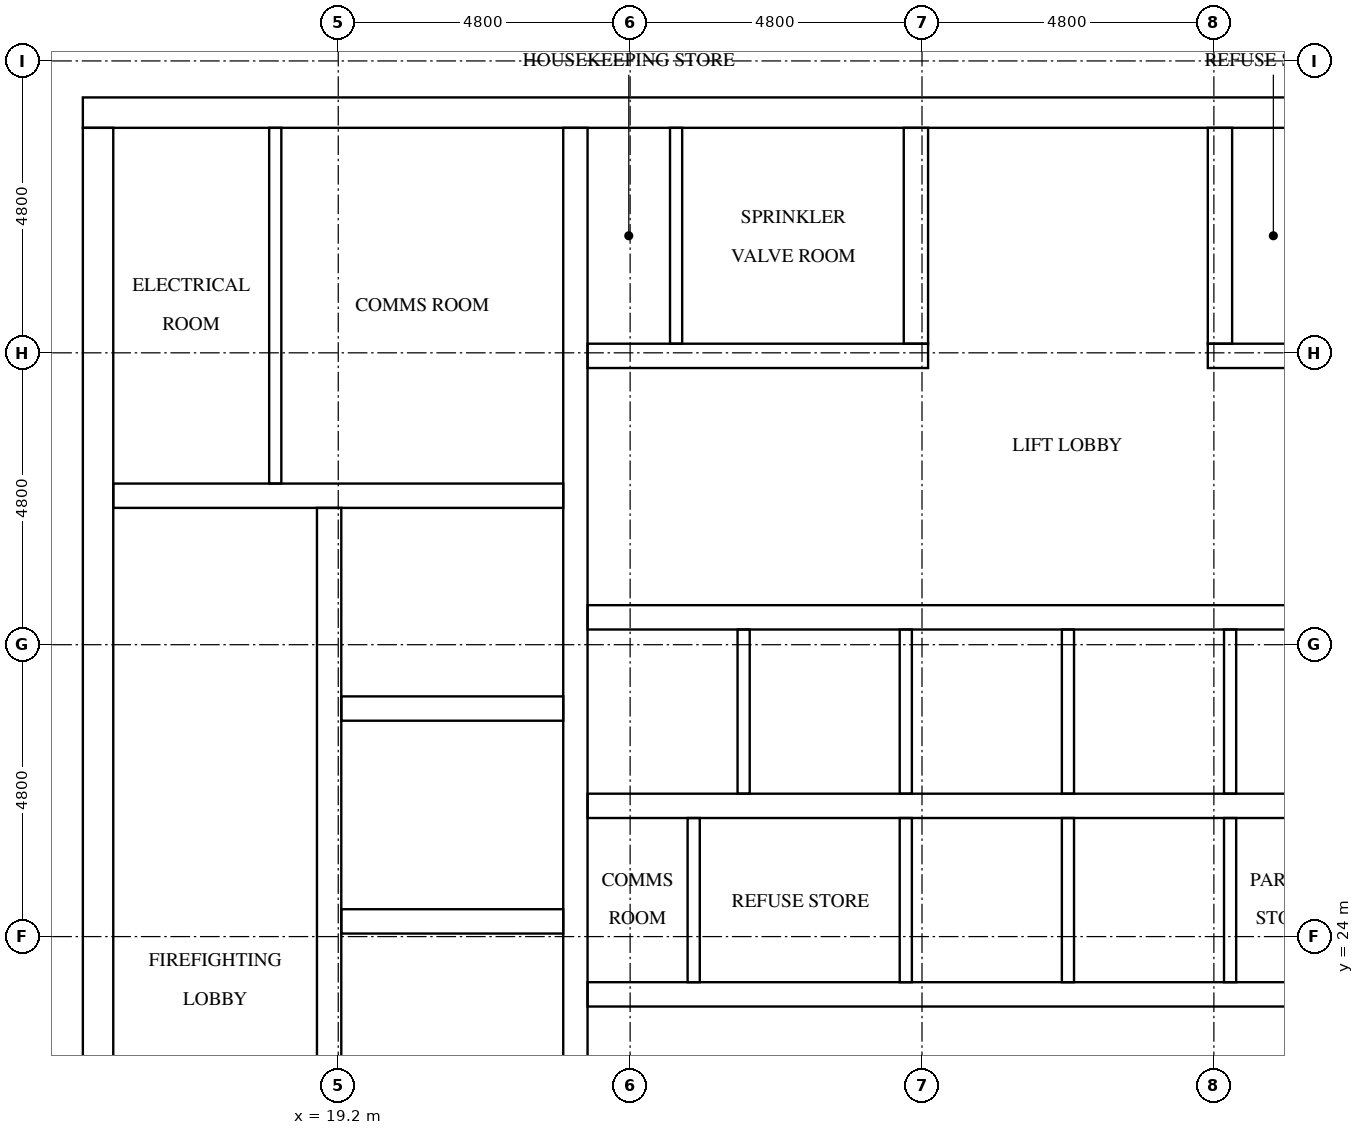
"""IFC4 building model, lengths in metres.
Left out: names, types, materials, properties, quantities, classifications, styles, units other than length and angle.
Written with IfcOpenShell. Run it as: python <this file> out.ifc"""

import sys

from ifc_helpers import new_model, si_unit, direction, frame, frame_2d, origin, place, context, subcontext, project, spatial, rectangle, extrude, element, fill, save


model = new_model("IFC4")
c1 = context("Model", 3, precision=1e-05, world=origin(), true_north=direction((0.0, 1.0)))
c2 = subcontext(c1, "Body", "Model", "MODEL_VIEW")
j1 = project(units=[si_unit("LENGTHUNIT", "METRE"), si_unit("PLANEANGLEUNIT", "RADIAN")], contexts=[c1])
p1 = place(None, origin())
s1 = spatial("IfcSite", under=j1, at=p1, CompositionType="ELEMENT")
p2 = place(p1, origin())
s2 = spatial("IfcBuilding", under=s1, at=p2, CompositionType="ELEMENT")
p3 = place(p2, frame((0.0, 0.0, 268.6)))
s3 = spatial("IfcBuildingStorey", under=s2, at=p3, CompositionType="ELEMENT", Elevation=268.6)
p4 = place(p3, frame((15.0, 37.55, 0.0), z_axis=(0.0, 0.0, 1.0), x_axis=(1.0, 0.0, 0.0)))
e1 = element("IfcWall", 1, at=p4, inside=s3, PredefinedType="SHEAR", context=c2, shape_type="SweptSolid", body=[
    extrude(rectangle(XDim=32.4, YDim=0.5, at=frame_2d((16.2, 0.0))), origin(), (0.0, 0.0, 1.0), 3.2),
])
p5 = place(p4, frame((15.3, 0.0, 0.0)))
e2 = element("IfcOpeningElement", 2, at=p5, cuts=e1, PredefinedType="OPENING", context=c2, shape_type="SweptSolid", body=[
    extrude(rectangle(XDim=1.8, YDim=2.1, at=frame_2d((0.9, 1.05))), frame((0.0, 0.26, 0.0), z_axis=(0.0, -1.0, 0.0), x_axis=(1.0, 0.0, 0.0)), (0.0, 0.0, 1.0), 0.52),
])
p6 = place(p4, frame((1.282, 0.0, 0.0)))
e3 = element("IfcOpeningElement", 3, at=p6, cuts=e1, PredefinedType="OPENING", context=c2, shape_type="SweptSolid", body=[
    extrude(rectangle(XDim=1.0, YDim=2.1, at=frame_2d((0.5, 1.05))), frame((0.0, 0.26, 0.0), z_axis=(0.0, -1.0, 0.0), x_axis=(1.0, 0.0, 0.0)), (0.0, 0.0, 1.0), 0.52),
])
p7 = place(p4, frame((5.082, 0.0, 0.0)))
e4 = element("IfcOpeningElement", 4, at=p7, cuts=e1, PredefinedType="OPENING", context=c2, shape_type="SweptSolid", body=[
    extrude(rectangle(XDim=1.0, YDim=2.1, at=frame_2d((0.5, 1.05))), frame((0.0, 0.26, 0.0), z_axis=(0.0, -1.0, 0.0), x_axis=(1.0, 0.0, 0.0)), (0.0, 0.0, 1.0), 0.52),
])
p8 = place(p3, frame((15.25, 15.5, 0.0), z_axis=(0.0, 0.0, 1.0), x_axis=(0.0, 1.0, 0.0)))
e5 = element("IfcWall", 5, at=p8, inside=s3, PredefinedType="SHEAR", context=c2, shape_type="SweptSolid", body=[
    extrude(rectangle(XDim=21.8, YDim=0.5, at=frame_2d((10.9, 0.0))), origin(), (0.0, 0.0, 1.0), 3.2),
])
p9 = place(p8, frame((5.26, 0.0, 0.0)))
e6 = element("IfcOpeningElement", 6, at=p9, cuts=e5, PredefinedType="OPENING", context=c2, shape_type="SweptSolid", body=[
    extrude(rectangle(XDim=1.2, YDim=2.1, at=frame_2d((0.6, 1.05))), frame((0.0, 0.26, 0.0), z_axis=(0.0, -1.0, 0.0), x_axis=(1.0, 0.0, 0.0)), (0.0, 0.0, 1.0), 0.52),
])
p10 = place(p3, frame((19.05, 15.5, 0.0), z_axis=(0.0, 0.0, 1.0), x_axis=(0.0, 1.0, 0.0)))
e7 = element("IfcWall", 7, at=p10, inside=s3, PredefinedType="SHEAR", context=c2, shape_type="SweptSolid", body=[
    extrude(rectangle(XDim=15.55, YDim=0.4, at=frame_2d((7.775, 0.0))), origin(), (0.0, 0.0, 1.0), 3.2),
])
p11 = place(p10, frame((9.95, 0.0, 0.0)))
e8 = element("IfcOpeningElement", 8, at=p11, cuts=e7, PredefinedType="OPENING", context=c2, shape_type="SweptSolid", body=[
    extrude(rectangle(XDim=1.1, YDim=2.1, at=frame_2d((0.55, 1.05))), frame((0.0, 0.21, 0.0), z_axis=(0.0, -1.0, 0.0), x_axis=(1.0, 0.0, 0.0)), (0.0, 0.0, 1.0), 0.42),
])
p12 = place(p10, frame((13.45, 0.0, 0.0)))
e9 = element("IfcOpeningElement", 9, at=p12, cuts=e7, PredefinedType="OPENING", context=c2, shape_type="SweptSolid", body=[
    extrude(rectangle(XDim=1.1, YDim=2.1, at=frame_2d((0.55, 1.05))), frame((0.0, 0.21, 0.0), z_axis=(0.0, -1.0, 0.0), x_axis=(1.0, 0.0, 0.0)), (0.0, 0.0, 1.0), 0.42),
])
p13 = place(p10, frame((0.7, 0.0, 0.0)))
e10 = element("IfcOpeningElement", 10, at=p13, cuts=e7, PredefinedType="OPENING", context=c2, shape_type="SweptSolid", body=[
    extrude(rectangle(XDim=1.2, YDim=2.1, at=frame_2d((0.6, 1.05))), frame((0.0, 0.21, 0.0), z_axis=(0.0, -1.0, 0.0), x_axis=(1.0, 0.0, 0.0)), (0.0, 0.0, 1.0), 0.42),
])
p14 = place(p3, frame((23.1, 15.5, 0.0), z_axis=(0.0, 0.0, 1.0), x_axis=(0.0, 1.0, 0.0)))
e11 = element("IfcWall", 11, at=p14, inside=s3, PredefinedType="SHEAR", context=c2, shape_type="SweptSolid", body=[
    extrude(rectangle(XDim=21.8, YDim=0.4, at=frame_2d((10.9, 0.0))), origin(), (0.0, 0.0, 1.0), 3.2),
])
for number, where, z_axis, x_axis in (
    (12, (19.25, 24.25, 0.0), (0.0, 0.0, 1.0), (1.0, 0.0, 0.0)),
    (13, (19.25, 27.75, 0.0), (0.0, 0.0, 1.0), (1.0, 0.0, 0.0)),
):
    element("IfcWall", number, at=place(p3, frame(where, z_axis=z_axis, x_axis=x_axis)), inside=s3, PredefinedType="SHEAR", context=c2, shape_type="SweptSolid", body=[
        extrude(rectangle(XDim=3.65, YDim=0.4, at=frame_2d((1.825, 0.0))), origin(), (0.0, 0.0, 1.0), 3.2),
    ])
p15 = place(p3, frame((15.5, 31.25, 0.0), z_axis=(0.0, 0.0, 1.0), x_axis=(1.0, 0.0, 0.0)))
e14 = element("IfcWall", 14, at=p15, inside=s3, PredefinedType="SHEAR", context=c2, shape_type="SweptSolid", body=[
    extrude(rectangle(XDim=7.4, YDim=0.4, at=frame_2d((3.7, 0.0))), origin(), (0.0, 0.0, 1.0), 3.2),
])
p16 = place(p3, frame((23.3, 23.05, 0.0), z_axis=(0.0, 0.0, 1.0), x_axis=(1.0, 0.0, 0.0)))
e15 = element("IfcWall", 15, at=p16, inside=s3, PredefinedType="SHEAR", context=c2, shape_type="SweptSolid", body=[
    extrude(rectangle(XDim=15.8, YDim=0.4, at=frame_2d((7.9, 0.0))), origin(), (0.0, 0.0, 1.0), 3.2),
])
p17 = place(p16, frame((0.323, 0.0, 0.0)))
e16 = element("IfcOpeningElement", 16, at=p17, cuts=e15, PredefinedType="OPENING", context=c2, shape_type="SweptSolid", body=[
    extrude(rectangle(XDim=1.0, YDim=2.1, at=frame_2d((0.5, 1.05))), frame((0.0, 0.21, 0.0), z_axis=(0.0, -1.0, 0.0), x_axis=(1.0, 0.0, 0.0)), (0.0, 0.0, 1.0), 0.42),
])
p18 = place(p16, frame((2.989, 0.0, 0.0)))
e17 = element("IfcOpeningElement", 17, at=p18, cuts=e15, PredefinedType="OPENING", context=c2, shape_type="SweptSolid", body=[
    extrude(rectangle(XDim=1.0, YDim=2.1, at=frame_2d((0.5, 1.05))), frame((0.0, 0.21, 0.0), z_axis=(0.0, -1.0, 0.0), x_axis=(1.0, 0.0, 0.0)), (0.0, 0.0, 1.0), 0.42),
])
p19 = place(p16, frame((10.989, 0.0, 0.0)))
e18 = element("IfcOpeningElement", 18, at=p19, cuts=e15, PredefinedType="OPENING", context=c2, shape_type="SweptSolid", body=[
    extrude(rectangle(XDim=1.0, YDim=2.1, at=frame_2d((0.5, 1.05))), frame((0.0, 0.21, 0.0), z_axis=(0.0, -1.0, 0.0), x_axis=(1.0, 0.0, 0.0)), (0.0, 0.0, 1.0), 0.42),
])
p20 = place(p16, frame((13.656, 0.0, 0.0)))
e19 = element("IfcOpeningElement", 19, at=p20, cuts=e15, PredefinedType="OPENING", context=c2, shape_type="SweptSolid", body=[
    extrude(rectangle(XDim=1.0, YDim=2.1, at=frame_2d((0.5, 1.05))), frame((0.0, 0.21, 0.0), z_axis=(0.0, -1.0, 0.0), x_axis=(1.0, 0.0, 0.0)), (0.0, 0.0, 1.0), 0.42),
])
p21 = place(p3, frame((23.3, 26.15, 0.0), z_axis=(0.0, 0.0, 1.0), x_axis=(1.0, 0.0, 0.0)))
e20 = element("IfcWall", 20, at=p21, inside=s3, PredefinedType="SHEAR", context=c2, shape_type="SweptSolid", body=[
    extrude(rectangle(XDim=15.8, YDim=0.4, at=frame_2d((7.9, 0.0))), origin(), (0.0, 0.0, 1.0), 3.2),
])
p22 = place(p3, frame((23.3, 29.25, 0.0), z_axis=(0.0, 0.0, 1.0), x_axis=(1.0, 0.0, 0.0)))
e21 = element("IfcWall", 21, at=p22, inside=s3, PredefinedType="SHEAR", context=c2, shape_type="SweptSolid", body=[
    extrude(rectangle(XDim=15.8, YDim=0.4, at=frame_2d((7.9, 0.0))), origin(), (0.0, 0.0, 1.0), 3.2),
])
p23 = place(p22, frame((0.683, 0.0, 0.0)))
e22 = element("IfcOpeningElement", 22, at=p23, cuts=e21, PredefinedType="OPENING", context=c2, shape_type="SweptSolid", body=[
    extrude(rectangle(XDim=1.1, YDim=2.1, at=frame_2d((0.55, 1.05))), frame((0.0, 0.21, 0.0), z_axis=(0.0, -1.0, 0.0), x_axis=(1.0, 0.0, 0.0)), (0.0, 0.0, 1.0), 0.42),
])
p24 = place(p22, frame((3.35, 0.0, 0.0)))
e23 = element("IfcOpeningElement", 23, at=p24, cuts=e21, PredefinedType="OPENING", context=c2, shape_type="SweptSolid", body=[
    extrude(rectangle(XDim=1.1, YDim=2.1, at=frame_2d((0.55, 1.05))), frame((0.0, 0.21, 0.0), z_axis=(0.0, -1.0, 0.0), x_axis=(1.0, 0.0, 0.0)), (0.0, 0.0, 1.0), 0.42),
])
p25 = place(p22, frame((6.017, 0.0, 0.0)))
e24 = element("IfcOpeningElement", 24, at=p25, cuts=e21, PredefinedType="OPENING", context=c2, shape_type="SweptSolid", body=[
    extrude(rectangle(XDim=1.1, YDim=2.1, at=frame_2d((0.55, 1.05))), frame((0.0, 0.21, 0.0), z_axis=(0.0, -1.0, 0.0), x_axis=(1.0, 0.0, 0.0)), (0.0, 0.0, 1.0), 0.42),
])
p26 = place(p22, frame((8.683, 0.0, 0.0)))
e25 = element("IfcOpeningElement", 25, at=p26, cuts=e21, PredefinedType="OPENING", context=c2, shape_type="SweptSolid", body=[
    extrude(rectangle(XDim=1.1, YDim=2.1, at=frame_2d((0.55, 1.05))), frame((0.0, 0.21, 0.0), z_axis=(0.0, -1.0, 0.0), x_axis=(1.0, 0.0, 0.0)), (0.0, 0.0, 1.0), 0.42),
])
p27 = place(p22, frame((11.35, 0.0, 0.0)))
e26 = element("IfcOpeningElement", 26, at=p27, cuts=e21, PredefinedType="OPENING", context=c2, shape_type="SweptSolid", body=[
    extrude(rectangle(XDim=1.1, YDim=2.1, at=frame_2d((0.55, 1.05))), frame((0.0, 0.21, 0.0), z_axis=(0.0, -1.0, 0.0), x_axis=(1.0, 0.0, 0.0)), (0.0, 0.0, 1.0), 0.42),
])
p28 = place(p22, frame((14.017, 0.0, 0.0)))
e27 = element("IfcOpeningElement", 27, at=p28, cuts=e21, PredefinedType="OPENING", context=c2, shape_type="SweptSolid", body=[
    extrude(rectangle(XDim=1.1, YDim=2.1, at=frame_2d((0.55, 1.05))), frame((0.0, 0.21, 0.0), z_axis=(0.0, -1.0, 0.0), x_axis=(1.0, 0.0, 0.0)), (0.0, 0.0, 1.0), 0.42),
])
p29 = place(p3, frame((23.3, 33.55, 0.0), z_axis=(0.0, 0.0, 1.0), x_axis=(1.0, 0.0, 0.0)))
e28 = element("IfcWall", 28, at=p29, inside=s3, PredefinedType="SHEAR", context=c2, shape_type="SweptSolid", body=[
    extrude(rectangle(XDim=5.6, YDim=0.4, at=frame_2d((2.8, 0.0))), origin(), (0.0, 0.0, 1.0), 3.2),
])
p30 = place(p29, frame((0.178, 0.0, 0.0)))
e29 = element("IfcOpeningElement", 29, at=p30, cuts=e28, PredefinedType="OPENING", context=c2, shape_type="SweptSolid", body=[
    extrude(rectangle(XDim=1.0, YDim=2.1, at=frame_2d((0.5, 1.05))), frame((0.0, 0.21, 0.0), z_axis=(0.0, -1.0, 0.0), x_axis=(1.0, 0.0, 0.0)), (0.0, 0.0, 1.0), 0.42),
])
p31 = place(p29, frame((2.878, 0.0, 0.0)))
e30 = element("IfcOpeningElement", 30, at=p31, cuts=e28, PredefinedType="OPENING", context=c2, shape_type="SweptSolid", body=[
    extrude(rectangle(XDim=1.0, YDim=2.1, at=frame_2d((0.5, 1.05))), frame((0.0, 0.21, 0.0), z_axis=(0.0, -1.0, 0.0), x_axis=(1.0, 0.0, 0.0)), (0.0, 0.0, 1.0), 0.42),
])
p32 = place(p3, frame((33.5, 33.55, 0.0), z_axis=(0.0, 0.0, 1.0), x_axis=(1.0, 0.0, 0.0)))
e31 = element("IfcWall", 31, at=p32, inside=s3, PredefinedType="SHEAR", context=c2, shape_type="SweptSolid", body=[
    extrude(rectangle(XDim=5.6, YDim=0.4, at=frame_2d((2.8, 0.0))), origin(), (0.0, 0.0, 1.0), 3.2),
])
p33 = place(p32, frame((0.578, 0.0, 0.0)))
e32 = element("IfcOpeningElement", 32, at=p33, cuts=e31, PredefinedType="OPENING", context=c2, shape_type="SweptSolid", body=[
    extrude(rectangle(XDim=1.0, YDim=2.1, at=frame_2d((0.5, 1.05))), frame((0.0, 0.21, 0.0), z_axis=(0.0, -1.0, 0.0), x_axis=(1.0, 0.0, 0.0)), (0.0, 0.0, 1.0), 0.42),
])
p34 = place(p32, frame((3.278, 0.0, 0.0)))
e33 = element("IfcOpeningElement", 33, at=p34, cuts=e31, PredefinedType="OPENING", context=c2, shape_type="SweptSolid", body=[
    extrude(rectangle(XDim=1.0, YDim=2.1, at=frame_2d((0.5, 1.05))), frame((0.0, 0.21, 0.0), z_axis=(0.0, -1.0, 0.0), x_axis=(1.0, 0.0, 0.0)), (0.0, 0.0, 1.0), 0.42),
])
for number, where, z_axis, x_axis in (
    (34, (28.7, 33.75, 0.0), (0.0, 0.0, 1.0), (0.0, 1.0, 0.0)),
    (35, (33.7, 33.75, 0.0), (0.0, 0.0, 1.0), (0.0, 1.0, 0.0)),
):
    element("IfcWall", number, at=place(p3, frame(where, z_axis=z_axis, x_axis=x_axis)), inside=s3, PredefinedType="SHEAR", context=c2, shape_type="SweptSolid", body=[
        extrude(rectangle(XDim=3.55, YDim=0.4, at=frame_2d((1.775, 0.0))), origin(), (0.0, 0.0, 1.0), 3.2),
    ])
for number, where, z_axis, x_axis in (
    (36, (25.867, 26.35, 0.0), (0.0, 0.0, 1.0), (0.0, 1.0, 0.0)),
    (37, (28.533, 23.25, 0.0), (0.0, 0.0, 1.0), (0.0, 1.0, 0.0)),
    (38, (28.533, 26.35, 0.0), (0.0, 0.0, 1.0), (0.0, 1.0, 0.0)),
    (39, (31.2, 23.25, 0.0), (0.0, 0.0, 1.0), (0.0, 1.0, 0.0)),
    (40, (31.2, 26.35, 0.0), (0.0, 0.0, 1.0), (0.0, 1.0, 0.0)),
    (41, (33.867, 23.25, 0.0), (0.0, 0.0, 1.0), (0.0, 1.0, 0.0)),
    (42, (33.867, 26.35, 0.0), (0.0, 0.0, 1.0), (0.0, 1.0, 0.0)),
):
    element("IfcWall", number, at=place(p3, frame(where, z_axis=z_axis, x_axis=x_axis)), inside=s3, PredefinedType="SOLIDWALL", context=c2, shape_type="SweptSolid", body=[
        extrude(rectangle(XDim=2.7, YDim=0.2, at=frame_2d((1.35, 0.0))), origin(), (0.0, 0.0, 1.0), 3.2),
    ])
p35 = place(p3, frame((18.164, 31.45, 0.0), z_axis=(0.0, 0.0, 1.0), x_axis=(0.0, 1.0, 0.0)))
e43 = element("IfcWall", 43, at=p35, inside=s3, PredefinedType="PARTITIONING", context=c2, shape_type="SweptSolid", body=[
    extrude(rectangle(XDim=5.85, YDim=0.2, at=frame_2d((2.925, 0.0))), origin(), (0.0, 0.0, 1.0), 3.2),
])
p36 = place(p3, frame((25.045, 23.25, 0.0), z_axis=(0.0, 0.0, 1.0), x_axis=(0.0, 1.0, 0.0)))
e44 = element("IfcWall", 44, at=p36, inside=s3, PredefinedType="PARTITIONING", context=c2, shape_type="SweptSolid", body=[
    extrude(rectangle(XDim=2.7, YDim=0.2, at=frame_2d((1.35, 0.0))), origin(), (0.0, 0.0, 1.0), 3.2),
])
p37 = place(p3, frame((24.756, 33.75, 0.0), z_axis=(0.0, 0.0, 1.0), x_axis=(0.0, 1.0, 0.0)))
e45 = element("IfcWall", 45, at=p37, inside=s3, PredefinedType="PARTITIONING", context=c2, shape_type="SweptSolid", body=[
    extrude(rectangle(XDim=3.55, YDim=0.2, at=frame_2d((1.775, 0.0))), origin(), (0.0, 0.0, 1.0), 3.2),
])
p38 = place(p23, origin())
e46 = element("IfcDoor", 46, at=p38, inside=s3, OperationType="DOUBLE_DOOR_SLIDING", PredefinedType="DOOR", context=c2, shape_type="SweptSolid", body=[
    extrude(rectangle(XDim=1.1, YDim=2.1, at=frame_2d((0.55, 1.05))), frame((0.0, 0.025, 0.0), z_axis=(0.0, -1.0, 0.0), x_axis=(1.0, 0.0, 0.0)), (0.0, 0.0, 1.0), 0.05),
])
fill(e22, e46)
p39 = place(p24, origin())
e47 = element("IfcDoor", 47, at=p39, inside=s3, OperationType="DOUBLE_DOOR_SLIDING", PredefinedType="DOOR", context=c2, shape_type="SweptSolid", body=[
    extrude(rectangle(XDim=1.1, YDim=2.1, at=frame_2d((0.55, 1.05))), frame((0.0, 0.025, 0.0), z_axis=(0.0, -1.0, 0.0), x_axis=(1.0, 0.0, 0.0)), (0.0, 0.0, 1.0), 0.05),
])
fill(e23, e47)
p40 = place(p25, origin())
e48 = element("IfcDoor", 48, at=p40, inside=s3, OperationType="DOUBLE_DOOR_SLIDING", PredefinedType="DOOR", context=c2, shape_type="SweptSolid", body=[
    extrude(rectangle(XDim=1.1, YDim=2.1, at=frame_2d((0.55, 1.05))), frame((0.0, 0.025, 0.0), z_axis=(0.0, -1.0, 0.0), x_axis=(1.0, 0.0, 0.0)), (0.0, 0.0, 1.0), 0.05),
])
fill(e24, e48)
p41 = place(p26, origin())
e49 = element("IfcDoor", 49, at=p41, inside=s3, OperationType="DOUBLE_DOOR_SLIDING", PredefinedType="DOOR", context=c2, shape_type="SweptSolid", body=[
    extrude(rectangle(XDim=1.1, YDim=2.1, at=frame_2d((0.55, 1.05))), frame((0.0, 0.025, 0.0), z_axis=(0.0, -1.0, 0.0), x_axis=(1.0, 0.0, 0.0)), (0.0, 0.0, 1.0), 0.05),
])
fill(e25, e49)
p42 = place(p27, origin())
e50 = element("IfcDoor", 50, at=p42, inside=s3, OperationType="DOUBLE_DOOR_SLIDING", PredefinedType="DOOR", context=c2, shape_type="SweptSolid", body=[
    extrude(rectangle(XDim=1.1, YDim=2.1, at=frame_2d((0.55, 1.05))), frame((0.0, 0.025, 0.0), z_axis=(0.0, -1.0, 0.0), x_axis=(1.0, 0.0, 0.0)), (0.0, 0.0, 1.0), 0.05),
])
fill(e26, e50)
p43 = place(p11, origin())
e51 = element("IfcDoor", 51, at=p43, inside=s3, OperationType="DOUBLE_DOOR_SLIDING", PredefinedType="DOOR", context=c2, shape_type="SweptSolid", body=[
    extrude(rectangle(XDim=1.1, YDim=2.1, at=frame_2d((0.55, 1.05))), frame((0.0, 0.025, 0.0), z_axis=(0.0, -1.0, 0.0), x_axis=(1.0, 0.0, 0.0)), (0.0, 0.0, 1.0), 0.05),
])
fill(e8, e51)
p44 = place(p12, origin())
e52 = element("IfcDoor", 52, at=p44, inside=s3, OperationType="DOUBLE_DOOR_SLIDING", PredefinedType="DOOR", context=c2, shape_type="SweptSolid", body=[
    extrude(rectangle(XDim=1.1, YDim=2.1, at=frame_2d((0.55, 1.05))), frame((0.0, 0.025, 0.0), z_axis=(0.0, -1.0, 0.0), x_axis=(1.0, 0.0, 0.0)), (0.0, 0.0, 1.0), 0.05),
])
fill(e9, e52)
p45 = place(p5, origin())
e53 = element("IfcDoor", 53, at=p45, inside=s3, OperationType="DOUBLE_DOOR_SINGLE_SWING", PredefinedType="DOOR", context=c2, shape_type="SweptSolid", body=[
    extrude(rectangle(XDim=1.8, YDim=2.1, at=frame_2d((0.9, 1.05))), frame((0.0, 0.025, 0.0), z_axis=(0.0, -1.0, 0.0), x_axis=(1.0, 0.0, 0.0)), (0.0, 0.0, 1.0), 0.05),
])
fill(e2, e53)
p46 = place(p6, origin())
e54 = element("IfcDoor", 54, at=p46, inside=s3, OperationType="SINGLE_SWING_LEFT", PredefinedType="DOOR", context=c2, shape_type="SweptSolid", body=[
    extrude(rectangle(XDim=1.0, YDim=2.1, at=frame_2d((0.5, 1.05))), frame((0.0, 0.025, 0.0), z_axis=(0.0, -1.0, 0.0), x_axis=(1.0, 0.0, 0.0)), (0.0, 0.0, 1.0), 0.05),
])
fill(e3, e54)
p47 = place(p7, origin())
e55 = element("IfcDoor", 55, at=p47, inside=s3, OperationType="SINGLE_SWING_RIGHT", PredefinedType="DOOR", context=c2, shape_type="SweptSolid", body=[
    extrude(rectangle(XDim=1.0, YDim=2.1, at=frame_2d((0.5, 1.05))), frame((0.0, 0.025, 0.0), z_axis=(0.0, -1.0, 0.0), x_axis=(1.0, 0.0, 0.0)), (0.0, 0.0, 1.0), 0.05),
])
fill(e4, e55)
p48 = place(p17, frame((1.0, 0.0, 0.0), z_axis=(0.0, 0.0, 1.0), x_axis=(-1.0, 0.0, 0.0)))
e56 = element("IfcDoor", 56, at=p48, inside=s3, OperationType="SINGLE_SWING_LEFT", PredefinedType="DOOR", context=c2, shape_type="SweptSolid", body=[
    extrude(rectangle(XDim=1.0, YDim=2.1, at=frame_2d((0.5, 1.05))), frame((0.0, 0.025, 0.0), z_axis=(0.0, -1.0, 0.0), x_axis=(1.0, 0.0, 0.0)), (0.0, 0.0, 1.0), 0.05),
])
fill(e16, e56)
p49 = place(p18, frame((1.0, 0.0, 0.0), z_axis=(0.0, 0.0, 1.0), x_axis=(-1.0, 0.0, 0.0)))
e57 = element("IfcDoor", 57, at=p49, inside=s3, OperationType="SINGLE_SWING_RIGHT", PredefinedType="DOOR", context=c2, shape_type="SweptSolid", body=[
    extrude(rectangle(XDim=1.0, YDim=2.1, at=frame_2d((0.5, 1.05))), frame((0.0, 0.025, 0.0), z_axis=(0.0, -1.0, 0.0), x_axis=(1.0, 0.0, 0.0)), (0.0, 0.0, 1.0), 0.05),
])
fill(e17, e57)
p50 = place(p19, frame((1.0, 0.0, 0.0), z_axis=(0.0, 0.0, 1.0), x_axis=(-1.0, 0.0, 0.0)))
e58 = element("IfcDoor", 58, at=p50, inside=s3, OperationType="SINGLE_SWING_LEFT", PredefinedType="DOOR", context=c2, shape_type="SweptSolid", body=[
    extrude(rectangle(XDim=1.0, YDim=2.1, at=frame_2d((0.5, 1.05))), frame((0.0, 0.025, 0.0), z_axis=(0.0, -1.0, 0.0), x_axis=(1.0, 0.0, 0.0)), (0.0, 0.0, 1.0), 0.05),
])
fill(e18, e58)
p51 = place(p30, frame((1.0, 0.0, 0.0), z_axis=(0.0, 0.0, 1.0), x_axis=(-1.0, 0.0, 0.0)))
e59 = element("IfcDoor", 59, at=p51, inside=s3, OperationType="SINGLE_SWING_LEFT", PredefinedType="DOOR", context=c2, shape_type="SweptSolid", body=[
    extrude(rectangle(XDim=1.0, YDim=2.1, at=frame_2d((0.5, 1.05))), frame((0.0, 0.025, 0.0), z_axis=(0.0, -1.0, 0.0), x_axis=(1.0, 0.0, 0.0)), (0.0, 0.0, 1.0), 0.05),
])
fill(e29, e59)
p52 = place(p31, frame((1.0, 0.0, 0.0), z_axis=(0.0, 0.0, 1.0), x_axis=(-1.0, 0.0, 0.0)))
e60 = element("IfcDoor", 60, at=p52, inside=s3, OperationType="SINGLE_SWING_RIGHT", PredefinedType="DOOR", context=c2, shape_type="SweptSolid", body=[
    extrude(rectangle(XDim=1.0, YDim=2.1, at=frame_2d((0.5, 1.05))), frame((0.0, 0.025, 0.0), z_axis=(0.0, -1.0, 0.0), x_axis=(1.0, 0.0, 0.0)), (0.0, 0.0, 1.0), 0.05),
])
fill(e30, e60)
p53 = place(p33, frame((1.0, 0.0, 0.0), z_axis=(0.0, 0.0, 1.0), x_axis=(-1.0, 0.0, 0.0)))
e61 = element("IfcDoor", 61, at=p53, inside=s3, OperationType="SINGLE_SWING_LEFT", PredefinedType="DOOR", context=c2, shape_type="SweptSolid", body=[
    extrude(rectangle(XDim=1.0, YDim=2.1, at=frame_2d((0.5, 1.05))), frame((0.0, 0.025, 0.0), z_axis=(0.0, -1.0, 0.0), x_axis=(1.0, 0.0, 0.0)), (0.0, 0.0, 1.0), 0.05),
])
fill(e32, e61)
save(model, sys.argv[1])
